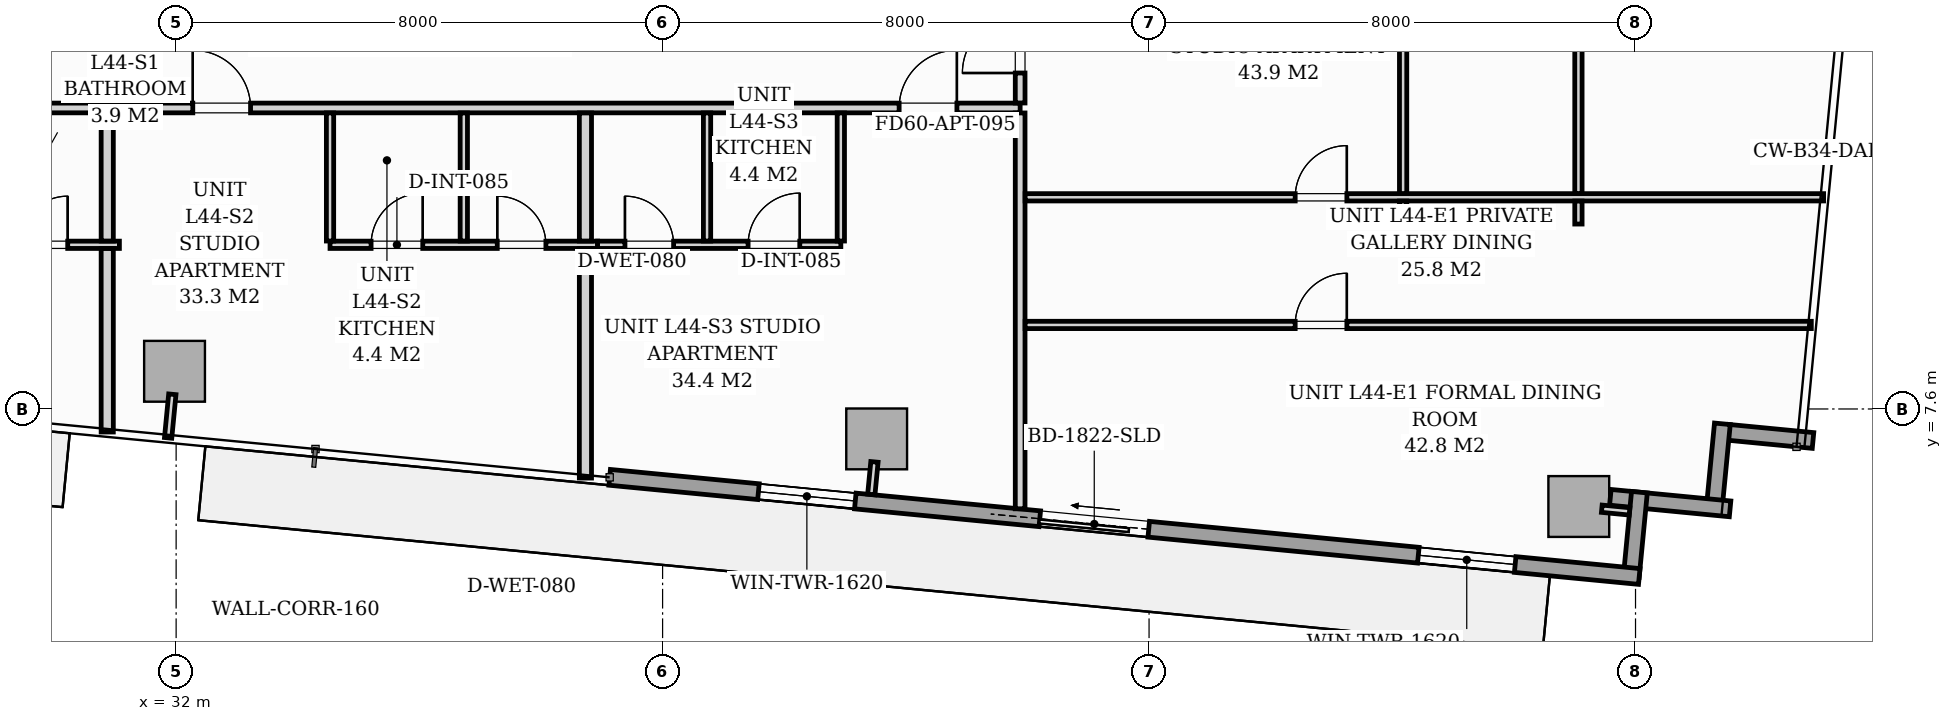
"""IFC4 building model, lengths in metres.
Left out: names, types, materials, properties, quantities, classifications, styles, units other than length and angle.
Written with IfcOpenShell. Run it as: python <this file> out.ifc"""

import sys

from ifc_helpers import new_model, si_unit, direction, frame, frame_2d, origin, origin_2d, place, context, subcontext, project, spatial, rectangle, extrude, source, transform, mapped, element, fill, save


model = new_model("IFC4")
c1 = context("Model", 3, precision=1e-05, world=origin(), true_north=direction((0.0, 1.0)))
c2 = subcontext(c1, "Body", "Model", "MODEL_VIEW")
j1 = project(units=[si_unit("LENGTHUNIT", "METRE"), si_unit("PLANEANGLEUNIT", "RADIAN")], contexts=[c1])
p1 = place(None, origin())
s1 = spatial("IfcSite", under=j1, at=p1, CompositionType="ELEMENT")
p2 = place(p1, origin())
s2 = spatial("IfcBuilding", under=s1, at=p2, CompositionType="ELEMENT")
p3 = place(p2, frame((0.0, 0.0, 153.4)))
s3 = spatial("IfcBuildingStorey", under=s2, at=p3, CompositionType="ELEMENT", Elevation=153.4)
m1 = source(origin(), c2, "Body", "SweptSolid", [
    extrude(rectangle(XDim=1.0, YDim=1.0, at=origin_2d()), origin(), (0.0, 0.0, 1.0), 3.196),
])
for number, where, z_axis, x_axis in (
    (1, (31.974, 8.22, 0.002), (0.0, 0.0, 1.0), (0.995, -0.096, 0.0)),
    (2, (43.521, 7.108, 0.002), (0.0, 0.0, 1.0), (0.995, -0.096, 0.0)),
    (3, (55.067, 5.996, 0.002), (0.0, 0.0, 1.0), (0.995, -0.096, 0.0)),
):
    element("IfcColumn", number, at=place(p3, frame(where, z_axis=z_axis, x_axis=x_axis)), inside=s3, PredefinedType="COLUMN", context=c2, shape_type="MappedRepresentation", body=[
        mapped(m1, transform((0.0, 0.0, 0.0), scale=1.0)),
    ])
for number, where, z_axis, x_axis in (
    (4, (58.919, 7.082, 0.0), (0.0, 0.0, 1.0), (-0.995, 0.096, 0.0)),
    (5, (57.428, 7.356, 0.0), (0.0, 0.0, 1.0), (-0.096, -0.995, 0.0)),
):
    element("IfcWall", number, at=place(p3, frame(where, z_axis=z_axis, x_axis=x_axis)), inside=s3, PredefinedType="STANDARD", context=c2, shape_type="SweptSolid", body=[
        extrude(rectangle(XDim=1.395, YDim=0.26, at=frame_2d((0.697, 0.0))), origin(), (0.0, 0.0, 1.0), 2.94),
    ])
p4 = place(p3, frame((57.555, 5.958, 0.0), z_axis=(0.0, 0.0, 1.0), x_axis=(-0.995401789159, 0.095787672171, 0.0)))
e6 = element("IfcWall", 6, at=p4, inside=s3, PredefinedType="STANDARD", context=c2, shape_type="SweptSolid", body=[
    extrude(rectangle(XDim=1.978, YDim=0.26, at=frame_2d((0.989, 0.0))), origin(), (0.0, 0.0, 1.0), 2.94),
])
p5 = place(p3, frame((56.064, 6.232, 0.0), z_axis=(0.0, 0.0, 1.0), x_axis=(-0.09589913835, -0.995391056452, 0.0)))
e7 = element("IfcWall", 7, at=p5, inside=s3, PredefinedType="STANDARD", context=c2, shape_type="SweptSolid", body=[
    extrude(rectangle(XDim=1.395, YDim=0.26, at=frame_2d((0.698, 0.0))), origin(), (0.0, 0.0, 1.0), 2.94),
])
p6 = place(p3, frame((56.061, 4.845, 0.0), z_axis=(0.0, 0.0, 1.0), x_axis=(-0.995395976631, 0.095848055311, 0.0)))
e8 = element("IfcWall", 8, at=p6, inside=s3, PredefinedType="STANDARD", context=c2, shape_type="SweptSolid", body=[
    extrude(rectangle(XDim=17.01, YDim=0.26, at=frame_2d((8.505, 0.0))), origin(), (0.0, 0.0, 1.0), 2.94),
])
p7 = place(p6, frame((8.104, 0.0, 0.0)))
e9 = element("IfcOpeningElement", 9, at=p7, cuts=e8, PredefinedType="OPENING", context=c2, shape_type="SweptSolid", body=[
    extrude(rectangle(XDim=1.8, YDim=2.06, at=frame_2d((0.9, 1.03))), frame((0.0, 0.14, 0.0), z_axis=(0.0, -1.0, 0.0), x_axis=(1.0, 0.0, 0.0)), (0.0, 0.0, 1.0), 0.28),
])
p8 = place(p6, frame((2.05, 0.0, 0.65)))
e10 = element("IfcOpeningElement", 10, at=p8, cuts=e8, PredefinedType="OPENING", context=c2, shape_type="SweptSolid", body=[
    extrude(rectangle(XDim=1.6, YDim=1.5, at=frame_2d((0.8, 0.75))), frame((0.0, 0.14, 0.0), z_axis=(0.0, -1.0, 0.0), x_axis=(1.0, 0.0, 0.0)), (0.0, 0.0, 1.0), 0.28),
])
p9 = place(p6, frame((12.952, 0.0, 0.75)))
e11 = element("IfcOpeningElement", 11, at=p9, cuts=e8, PredefinedType="OPENING", context=c2, shape_type="SweptSolid", body=[
    extrude(rectangle(XDim=1.6, YDim=1.5, at=frame_2d((0.8, 0.75))), frame((0.0, 0.14, 0.0), z_axis=(0.0, -1.0, 0.0), x_axis=(1.0, 0.0, 0.0)), (0.0, 0.0, 1.0), 0.28),
])
p10 = place(p3, frame((22.05, 12.55, 0.0), z_axis=(0.0, 0.0, 1.0), x_axis=(1.0, 0.0, 0.0)))
e12 = element("IfcWall", 12, at=p10, inside=s3, PredefinedType="PARTITIONING", context=c2, shape_type="SweptSolid", body=[
    extrude(rectangle(XDim=23.83, YDim=0.16, at=frame_2d((11.915, 0.0))), origin(), (0.0, 0.0, 1.0), 2.94),
])
p11 = place(p10, frame((1.873, 0.0, 0.0)))
e13 = element("IfcOpeningElement", 13, at=p11, cuts=e12, PredefinedType="OPENING", context=c2, shape_type="SweptSolid", body=[
    extrude(rectangle(XDim=0.95, YDim=2.06, at=frame_2d((0.475, 1.03))), frame((0.0, 0.09, 0.0), z_axis=(0.0, -1.0, 0.0), x_axis=(1.0, 0.0, 0.0)), (0.0, 0.0, 1.0), 0.18),
])
p12 = place(p10, frame((10.224, 0.0, 0.0)))
e14 = element("IfcOpeningElement", 14, at=p12, cuts=e12, PredefinedType="OPENING", context=c2, shape_type="SweptSolid", body=[
    extrude(rectangle(XDim=0.95, YDim=2.06, at=frame_2d((0.475, 1.03))), frame((0.0, 0.09, 0.0), z_axis=(0.0, -1.0, 0.0), x_axis=(1.0, 0.0, 0.0)), (0.0, 0.0, 1.0), 0.18),
])
p13 = place(p10, frame((21.84, 0.0, 0.0)))
e15 = element("IfcOpeningElement", 15, at=p13, cuts=e12, PredefinedType="OPENING", context=c2, shape_type="SweptSolid", body=[
    extrude(rectangle(XDim=0.95, YDim=2.06, at=frame_2d((0.475, 1.03))), frame((0.0, 0.09, 0.0), z_axis=(0.0, -1.0, 0.0), x_axis=(1.0, 0.0, 0.0)), (0.0, 0.0, 1.0), 0.18),
])
p14 = place(p3, frame((45.88, 5.958, 0.0), z_axis=(0.0, 0.0, 1.0), x_axis=(0.0, 1.0, 0.0)))
e16 = element("IfcWall", 16, at=p14, inside=s3, PredefinedType="PARTITIONING", context=c2, shape_type="SweptSolid", body=[
    extrude(rectangle(XDim=6.51, YDim=0.16, at=frame_2d((3.255, 0.0))), origin(), (0.0, 0.0, 1.0), 2.94),
])
p15 = place(p3, frame((45.88, 12.632, 0.0), z_axis=(0.0, 0.0, 1.0), x_axis=(0.0, 1.0, 0.0)))
e17 = element("IfcWall", 17, at=p15, inside=s3, PredefinedType="PARTITIONING", context=c2, shape_type="SweptSolid", body=[
    extrude(rectangle(XDim=4.466, YDim=0.16, at=frame_2d((2.233, 0.0))), origin(), (0.0, 0.0, 1.0), 2.94),
])
p16 = place(p15, frame((0.493, 0.0, 0.0)))
e18 = element("IfcOpeningElement", 18, at=p16, cuts=e17, PredefinedType="OPENING", context=c2, shape_type="SweptSolid", body=[
    extrude(rectangle(XDim=0.95, YDim=2.06, at=frame_2d((0.475, 1.03))), frame((0.0, 0.09, 0.0), z_axis=(0.0, -1.0, 0.0), x_axis=(1.0, 0.0, 0.0)), (0.0, 0.0, 1.0), 0.18),
])
p17 = place(p3, frame((26.667, 10.3, 0.0), z_axis=(0.0, 0.0, 1.0), x_axis=(1.0, 0.0, 0.0)))
e19 = element("IfcWall", 19, at=p17, inside=s3, PredefinedType="PARTITIONING", context=c2, shape_type="SweptSolid", body=[
    extrude(rectangle(XDim=4.4, YDim=0.12, at=frame_2d((2.2, 0.0))), origin(), (0.0, 0.0, 1.0), 2.94),
])
p18 = place(p17, frame((0.675, 0.0, 0.0)))
e20 = element("IfcOpeningElement", 20, at=p18, cuts=e19, PredefinedType="OPENING", context=c2, shape_type="SweptSolid", body=[
    extrude(rectangle(XDim=0.85, YDim=2.05, at=frame_2d((0.425, 1.025))), frame((0.0, 0.07, 0.0), z_axis=(0.0, -1.0, 0.0), x_axis=(1.0, 0.0, 0.0)), (0.0, 0.0, 1.0), 0.14),
])
p19 = place(p17, frame((2.75, 0.0, 0.0)))
e21 = element("IfcOpeningElement", 21, at=p19, cuts=e19, PredefinedType="OPENING", context=c2, shape_type="SweptSolid", body=[
    extrude(rectangle(XDim=0.8, YDim=2.02, at=frame_2d((0.4, 1.01))), frame((0.0, 0.07, 0.0), z_axis=(0.0, -1.0, 0.0), x_axis=(1.0, 0.0, 0.0)), (0.0, 0.0, 1.0), 0.14),
])
p20 = place(p3, frame((30.867, 7.221, 0.0), z_axis=(0.0, 0.0, 1.0), x_axis=(0.0, 1.0, 0.0)))
e22 = element("IfcWall", 22, at=p20, inside=s3, PredefinedType="PARTITIONING", context=c2, shape_type="SweptSolid", body=[
    extrude(rectangle(XDim=3.017, YDim=0.2, at=frame_2d((1.508, 0.0))), origin(), (0.0, 0.0, 1.0), 2.94),
])
p21 = place(p3, frame((30.867, 10.362, 0.0), z_axis=(0.0, 0.0, 1.0), x_axis=(0.0, 1.0, 0.0)))
e23 = element("IfcWall", 23, at=p21, inside=s3, PredefinedType="PARTITIONING", context=c2, shape_type="SweptSolid", body=[
    extrude(rectangle(XDim=2.106, YDim=0.2, at=frame_2d((1.053, 0.0))), origin(), (0.0, 0.0, 1.0), 2.94),
])
p22 = place(p3, frame((34.531, 10.3, 0.0), z_axis=(0.0, 0.0, 1.0), x_axis=(1.0, 0.0, 0.0)))
e24 = element("IfcWall", 24, at=p22, inside=s3, PredefinedType="PARTITIONING", context=c2, shape_type="SweptSolid", body=[
    extrude(rectangle(XDim=4.4, YDim=0.12, at=frame_2d((2.2, 0.0))), origin(), (0.0, 0.0, 1.0), 2.94),
])
p23 = place(p22, frame((0.675, 0.0, 0.0)))
e25 = element("IfcOpeningElement", 25, at=p23, cuts=e24, PredefinedType="OPENING", context=c2, shape_type="SweptSolid", body=[
    extrude(rectangle(XDim=0.85, YDim=2.05, at=frame_2d((0.425, 1.025))), frame((0.0, 0.07, 0.0), z_axis=(0.0, -1.0, 0.0), x_axis=(1.0, 0.0, 0.0)), (0.0, 0.0, 1.0), 0.14),
])
p24 = place(p22, frame((2.75, 0.0, 0.0)))
e26 = element("IfcOpeningElement", 26, at=p24, cuts=e24, PredefinedType="OPENING", context=c2, shape_type="SweptSolid", body=[
    extrude(rectangle(XDim=0.8, YDim=2.02, at=frame_2d((0.4, 1.01))), frame((0.0, 0.07, 0.0), z_axis=(0.0, -1.0, 0.0), x_axis=(1.0, 0.0, 0.0)), (0.0, 0.0, 1.0), 0.14),
])
for number, where, z_axis, x_axis in (
    (27, (34.531, 10.362, 0.0), (0.0, 0.0, 1.0), (0.0, 1.0, 0.0)),
    (28, (36.731, 10.362, 0.0), (0.0, 0.0, 1.0), (0.0, 1.0, 0.0)),
):
    element("IfcWall", number, at=place(p3, frame(where, z_axis=z_axis, x_axis=x_axis)), inside=s3, PredefinedType="PARTITIONING", context=c2, shape_type="SweptSolid", body=[
        extrude(rectangle(XDim=2.106, YDim=0.12, at=frame_2d((1.053, 0.0))), origin(), (0.0, 0.0, 1.0), 2.94),
    ])
p25 = place(p3, frame((38.731, 6.464, 0.0), z_axis=(0.0, 0.0, 1.0), x_axis=(0.0, 1.0, 0.0)))
e29 = element("IfcWall", 29, at=p25, inside=s3, PredefinedType="PARTITIONING", context=c2, shape_type="SweptSolid", body=[
    extrude(rectangle(XDim=3.774, YDim=0.2, at=frame_2d((1.887, 0.0))), origin(), (0.0, 0.0, 1.0), 2.94),
])
p26 = place(p3, frame((38.731, 10.362, 0.0), z_axis=(0.0, 0.0, 1.0), x_axis=(0.0, 1.0, 0.0)))
e30 = element("IfcWall", 30, at=p26, inside=s3, PredefinedType="PARTITIONING", context=c2, shape_type="SweptSolid", body=[
    extrude(rectangle(XDim=2.106, YDim=0.2, at=frame_2d((1.053, 0.0))), origin(), (0.0, 0.0, 1.0), 2.94),
])
p27 = place(p3, frame((38.931, 10.3, 0.0), z_axis=(0.0, 0.0, 1.0), x_axis=(1.0, 0.0, 0.0)))
e31 = element("IfcWall", 31, at=p27, inside=s3, PredefinedType="PARTITIONING", context=c2, shape_type="SweptSolid", body=[
    extrude(rectangle(XDim=4.0, YDim=0.12, at=frame_2d((2.0, 0.0))), origin(), (0.0, 0.0, 1.0), 2.94),
])
p28 = place(p27, frame((0.45, 0.0, 0.0)))
e32 = element("IfcOpeningElement", 32, at=p28, cuts=e31, PredefinedType="OPENING", context=c2, shape_type="SweptSolid", body=[
    extrude(rectangle(XDim=0.8, YDim=2.02, at=frame_2d((0.4, 1.01))), frame((0.0, 0.07, 0.0), z_axis=(0.0, -1.0, 0.0), x_axis=(1.0, 0.0, 0.0)), (0.0, 0.0, 1.0), 0.14),
])
p29 = place(p27, frame((2.475, 0.0, 0.0)))
e33 = element("IfcOpeningElement", 33, at=p29, cuts=e31, PredefinedType="OPENING", context=c2, shape_type="SweptSolid", body=[
    extrude(rectangle(XDim=0.85, YDim=2.05, at=frame_2d((0.425, 1.025))), frame((0.0, 0.07, 0.0), z_axis=(0.0, -1.0, 0.0), x_axis=(1.0, 0.0, 0.0)), (0.0, 0.0, 1.0), 0.14),
])
for number, where, z_axis, x_axis in (
    (34, (42.931, 10.362, 0.0), (0.0, 0.0, 1.0), (0.0, 1.0, 0.0)),
    (35, (40.731, 10.362, 0.0), (0.0, 0.0, 1.0), (0.0, 1.0, 0.0)),
):
    element("IfcWall", number, at=place(p3, frame(where, z_axis=z_axis, x_axis=x_axis)), inside=s3, PredefinedType="PARTITIONING", context=c2, shape_type="SweptSolid", body=[
        extrude(rectangle(XDim=2.106, YDim=0.12, at=frame_2d((1.053, 0.0))), origin(), (0.0, 0.0, 1.0), 2.94),
    ])
p30 = place(p3, frame((45.962, 8.982, 0.0), z_axis=(0.0, 0.0, 1.0), x_axis=(1.0, 0.0, 0.0)))
e36 = element("IfcWall", 36, at=p30, inside=s3, PredefinedType="PARTITIONING", context=c2, shape_type="SweptSolid", body=[
    extrude(rectangle(XDim=12.929, YDim=0.12, at=frame_2d((6.464, 0.0))), origin(), (0.0, 0.0, 1.0), 2.94),
])
p31 = place(p30, frame((4.441, 0.0, 0.0)))
e37 = element("IfcOpeningElement", 37, at=p31, cuts=e36, PredefinedType="OPENING", context=c2, shape_type="SweptSolid", body=[
    extrude(rectangle(XDim=0.85, YDim=2.05, at=frame_2d((0.425, 1.025))), frame((0.0, 0.07, 0.0), z_axis=(0.0, -1.0, 0.0), x_axis=(1.0, 0.0, 0.0)), (0.0, 0.0, 1.0), 0.14),
])
p32 = place(p3, frame((45.962, 11.081, 0.0), z_axis=(0.0, 0.0, 1.0), x_axis=(1.0, 0.0, 0.0)))
e38 = element("IfcWall", 38, at=p32, inside=s3, PredefinedType="PARTITIONING", context=c2, shape_type="SweptSolid", body=[
    extrude(rectangle(XDim=13.131, YDim=0.12, at=frame_2d((6.565, 0.0))), origin(), (0.0, 0.0, 1.0), 2.94),
])
p33 = place(p32, frame((4.441, 0.0, 0.0)))
e39 = element("IfcOpeningElement", 39, at=p33, cuts=e38, PredefinedType="OPENING", context=c2, shape_type="SweptSolid", body=[
    extrude(rectangle(XDim=0.85, YDim=2.05, at=frame_2d((0.425, 1.025))), frame((0.0, 0.07, 0.0), z_axis=(0.0, -1.0, 0.0), x_axis=(1.0, 0.0, 0.0)), (0.0, 0.0, 1.0), 0.14),
])
p34 = place(p3, frame((55.061, 10.641, 0.0), z_axis=(0.0, 0.0, 1.0), x_axis=(0.0, 1.0, 0.0)))
e40 = element("IfcWall", 40, at=p34, inside=s3, PredefinedType="PARTITIONING", context=c2, shape_type="SweptSolid", body=[
    extrude(rectangle(XDim=0.378, YDim=0.12, at=frame_2d((0.189, 0.0))), origin(), (0.0, 0.0, 1.0), 2.94),
])
p35 = place(p3, frame((55.061, 11.143, 0.0), z_axis=(0.0, 0.0, 1.0), x_axis=(0.0, 1.0, 0.0)))
e41 = element("IfcWall", 41, at=p35, inside=s3, PredefinedType="PARTITIONING", context=c2, shape_type="SweptSolid", body=[
    extrude(rectangle(XDim=8.848, YDim=0.12, at=frame_2d((4.424, 0.0))), origin(), (0.0, 0.0, 1.0), 2.94),
])
p36 = place(p35, frame((3.999, 0.0, 0.0)))
e42 = element("IfcOpeningElement", 42, at=p36, cuts=e41, PredefinedType="OPENING", context=c2, shape_type="SweptSolid", body=[
    extrude(rectangle(XDim=0.85, YDim=2.05, at=frame_2d((0.425, 1.025))), frame((0.0, 0.07, 0.0), z_axis=(0.0, -1.0, 0.0), x_axis=(1.0, 0.0, 0.0)), (0.0, 0.0, 1.0), 0.14),
])
p37 = place(p3, frame((52.178, 10.641, 0.0), z_axis=(0.0, 0.0, 1.0), x_axis=(0.0, 1.0, 0.0)))
e43 = element("IfcWall", 43, at=p37, inside=s3, PredefinedType="PARTITIONING", context=c2, shape_type="SweptSolid", body=[
    extrude(rectangle(XDim=0.378, YDim=0.12, at=frame_2d((0.189, 0.0))), origin(), (0.0, 0.0, 1.0), 2.94),
])
p38 = place(p3, frame((52.178, 11.143, 0.0), z_axis=(0.0, 0.0, 1.0), x_axis=(0.0, 1.0, 0.0)))
e44 = element("IfcWall", 44, at=p38, inside=s3, PredefinedType="PARTITIONING", context=c2, shape_type="SweptSolid", body=[
    extrude(rectangle(XDim=8.848, YDim=0.12, at=frame_2d((4.424, 0.0))), origin(), (0.0, 0.0, 1.0), 2.94),
])
p39 = place(p38, frame((3.999, 0.0, 0.0)))
e45 = element("IfcOpeningElement", 45, at=p39, cuts=e44, PredefinedType="OPENING", context=c2, shape_type="SweptSolid", body=[
    extrude(rectangle(XDim=0.85, YDim=2.05, at=frame_2d((0.425, 1.025))), frame((0.0, 0.07, 0.0), z_axis=(0.0, -1.0, 0.0), x_axis=(1.0, 0.0, 0.0)), (0.0, 0.0, 1.0), 0.14),
])
p40 = place(p3, frame((31.938, 7.841, 0.0), z_axis=(0.0, 0.0, 1.0), x_axis=(-0.095977354523, -0.995383517755, 0.0)))
e46 = element("IfcWall", 46, at=p40, inside=s3, PredefinedType="PARTITIONING", context=c2, shape_type="SweptSolid", body=[
    extrude(rectangle(XDim=0.72, YDim=0.12, at=frame_2d((0.36, 0.0))), origin(), (0.0, 0.0, 1.0), 2.94),
])
p41 = place(p3, frame((43.484, 6.729, 0.0), z_axis=(0.0, 0.0, 1.0), x_axis=(-0.095772948675, -0.995403205893, 0.0)))
e47 = element("IfcWall", 47, at=p41, inside=s3, PredefinedType="PARTITIONING", context=c2, shape_type="SweptSolid", body=[
    extrude(rectangle(XDim=0.538, YDim=0.12, at=frame_2d((0.269, 0.0))), origin(), (0.0, 0.0, 1.0), 2.94),
])
p42 = place(p3, frame((55.445, 5.96, 0.0), z_axis=(0.0, 0.0, 1.0), x_axis=(0.995384576284, -0.09596637586, 0.0)))
e48 = element("IfcWall", 48, at=p42, inside=s3, PredefinedType="PARTITIONING", context=c2, shape_type="SweptSolid", body=[
    extrude(rectangle(XDim=0.458, YDim=0.12, at=frame_2d((0.229, 0.0))), origin(), (0.0, 0.0, 1.0), 2.94),
])
m2 = source(origin(), c2, "Body", "SweptSolid", [
    extrude(rectangle(XDim=1.8, YDim=2.06, at=frame_2d((0.9, 1.03))), frame((0.0, 0.025, 0.0), z_axis=(0.0, -1.0, 0.0), x_axis=(1.0, 0.0, 0.0)), (0.0, 0.0, 1.0), 0.05),
])
p43 = place(p7, origin())
e49 = element("IfcDoor", 49, at=p43, inside=s3, OperationType="SLIDING_TO_RIGHT", PredefinedType="DOOR", context=c2, shape_type="MappedRepresentation", body=[
    mapped(m2, transform((0.0, 0.0, 0.0), scale=1.0)),
])
fill(e9, e49)
m3 = source(origin(), c2, "Body", "SweptSolid", [
    extrude(rectangle(XDim=1.6, YDim=1.5, at=frame_2d((0.8, 0.75))), frame((0.0, 0.03, 0.0), z_axis=(0.0, -1.0, 0.0), x_axis=(1.0, 0.0, 0.0)), (0.0, 0.0, 1.0), 0.06),
])
p44 = place(p8, origin())
e50 = element("IfcWindow", 50, at=p44, inside=s3, PartitioningType="SINGLE_PANEL", PredefinedType="WINDOW", context=c2, shape_type="MappedRepresentation", body=[
    mapped(m3, transform((0.0, 0.0, 0.0), scale=1.0)),
])
fill(e10, e50)
p45 = place(p9, origin())
e51 = element("IfcWindow", 51, at=p45, inside=s3, PartitioningType="SINGLE_PANEL", PredefinedType="WINDOW", context=c2, shape_type="MappedRepresentation", body=[
    mapped(m3, transform((0.0, 0.0, 0.0), scale=1.0)),
])
fill(e11, e51)
m4 = source(origin(), c2, "Body", "SweptSolid", [
    extrude(rectangle(XDim=0.8, YDim=2.02, at=frame_2d((0.4, 1.01))), frame((0.0, 0.025, 0.0), z_axis=(0.0, -1.0, 0.0), x_axis=(1.0, 0.0, 0.0)), (0.0, 0.0, 1.0), 0.05),
])
p46 = place(p19, origin())
e52 = element("IfcDoor", 52, at=p46, inside=s3, OperationType="SINGLE_SWING_RIGHT", PredefinedType="DOOR", context=c2, shape_type="MappedRepresentation", body=[
    mapped(m4, transform((0.0, 0.0, 0.0), scale=1.0)),
])
fill(e21, e52)
m5 = source(origin(), c2, "Body", "SweptSolid", [
    extrude(rectangle(XDim=0.95, YDim=2.06, at=frame_2d((0.475, 1.03))), frame((0.0, 0.025, 0.0), z_axis=(0.0, -1.0, 0.0), x_axis=(1.0, 0.0, 0.0)), (0.0, 0.0, 1.0), 0.05),
])
p47 = place(p12, origin())
e53 = element("IfcDoor", 53, at=p47, inside=s3, OperationType="SINGLE_SWING_LEFT", PredefinedType="DOOR", context=c2, shape_type="MappedRepresentation", body=[
    mapped(m5, transform((0.0, 0.0, 0.0), scale=1.0)),
])
fill(e14, e53)
m6 = source(origin(), c2, "Body", "SweptSolid", [
    extrude(rectangle(XDim=0.85, YDim=2.05, at=frame_2d((0.425, 1.025))), frame((0.0, 0.025, 0.0), z_axis=(0.0, -1.0, 0.0), x_axis=(1.0, 0.0, 0.0)), (0.0, 0.0, 1.0), 0.05),
])
p48 = place(p23, origin())
e54 = element("IfcDoor", 54, at=p48, inside=s3, OperationType="SINGLE_SWING_RIGHT", PredefinedType="DOOR", context=c2, shape_type="MappedRepresentation", body=[
    mapped(m6, transform((0.0, 0.0, 0.0), scale=1.0)),
])
fill(e25, e54)
p49 = place(p24, origin())
e55 = element("IfcDoor", 55, at=p49, inside=s3, OperationType="SINGLE_SWING_LEFT", PredefinedType="DOOR", context=c2, shape_type="MappedRepresentation", body=[
    mapped(m4, transform((0.0, 0.0, 0.0), scale=1.0)),
])
fill(e26, e55)
p50 = place(p13, origin())
e56 = element("IfcDoor", 56, at=p50, inside=s3, OperationType="SINGLE_SWING_RIGHT", PredefinedType="DOOR", context=c2, shape_type="MappedRepresentation", body=[
    mapped(m5, transform((0.0, 0.0, 0.0), scale=1.0)),
])
fill(e15, e56)
p51 = place(p28, origin())
e57 = element("IfcDoor", 57, at=p51, inside=s3, OperationType="SINGLE_SWING_LEFT", PredefinedType="DOOR", context=c2, shape_type="MappedRepresentation", body=[
    mapped(m4, transform((0.0, 0.0, 0.0), scale=1.0)),
])
fill(e32, e57)
p52 = place(p29, origin())
e58 = element("IfcDoor", 58, at=p52, inside=s3, OperationType="SINGLE_SWING_RIGHT", PredefinedType="DOOR", context=c2, shape_type="MappedRepresentation", body=[
    mapped(m6, transform((0.0, 0.0, 0.0), scale=1.0)),
])
fill(e33, e58)
p53 = place(p16, origin())
e59 = element("IfcDoor", 59, at=p53, inside=s3, OperationType="SINGLE_SWING_LEFT", PredefinedType="DOOR", context=c2, shape_type="MappedRepresentation", body=[
    mapped(m5, transform((0.0, 0.0, 0.0), scale=1.0)),
])
fill(e18, e59)
p54 = place(p31, origin())
e60 = element("IfcDoor", 60, at=p54, inside=s3, OperationType="SINGLE_SWING_RIGHT", PredefinedType="DOOR", context=c2, shape_type="MappedRepresentation", body=[
    mapped(m6, transform((0.0, 0.0, 0.0), scale=1.0)),
])
fill(e37, e60)
p55 = place(p33, origin())
e61 = element("IfcDoor", 61, at=p55, inside=s3, OperationType="SINGLE_SWING_RIGHT", PredefinedType="DOOR", context=c2, shape_type="MappedRepresentation", body=[
    mapped(m6, transform((0.0, 0.0, 0.0), scale=1.0)),
])
fill(e39, e61)
save(model, sys.argv[1])
